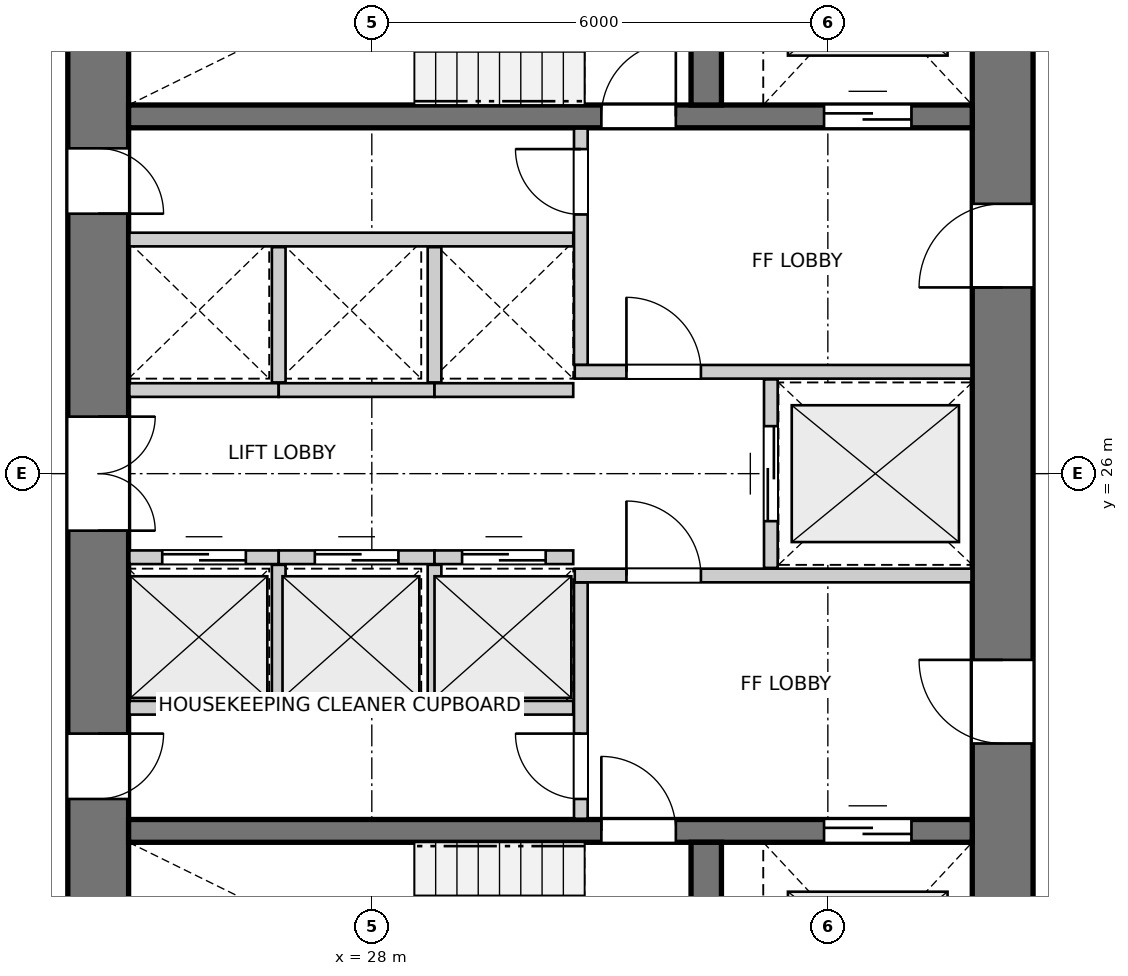
"""IFC4 building model, lengths in metres.
Left out: names, types, materials, properties, quantities, classifications, styles, units other than length and angle.
Written with IfcOpenShell. Run it as: python <this file> out.ifc"""

import sys

from ifc_helpers import new_model, si_unit, direction, frame, frame_2d, origin, place, context, subcontext, project, spatial, rectangle, extrude, source, transform, mapped, element, fill, save


model = new_model("IFC4")
c1 = context("Model", 3, precision=1e-05, world=origin(), true_north=direction((0.0, 1.0)))
c2 = subcontext(c1, "Body", "Model", "MODEL_VIEW")
j1 = project(units=[si_unit("LENGTHUNIT", "METRE"), si_unit("PLANEANGLEUNIT", "RADIAN")], contexts=[c1])
p1 = place(None, origin())
s1 = spatial("IfcSite", under=j1, at=p1, CompositionType="ELEMENT")
p2 = place(p1, origin())
s2 = spatial("IfcBuilding", under=s1, at=p2, CompositionType="ELEMENT")
p3 = place(p2, frame((0.0, 0.0, 11.0)))
s3 = spatial("IfcBuildingStorey", under=s2, at=p3, CompositionType="ELEMENT", Elevation=11.0)
p4 = place(p3, frame((24.4, 33.8, 0.0), z_axis=(0.0, 0.0, 1.0), x_axis=(0.0, -1.0, 0.0)))
e1 = element("IfcWall", 1, at=p4, inside=s3, PredefinedType="SHEAR", context=c2, shape_type="SweptSolid", body=[
    extrude(rectangle(XDim=15.6, YDim=0.8, at=frame_2d((7.8, 0.0))), origin(), (0.0, 0.0, 1.0), 2.94),
])
p5 = place(p4, frame((7.05, 0.0, 0.0)))
e2 = element("IfcOpeningElement", 2, at=p5, cuts=e1, PredefinedType="OPENING", context=c2, shape_type="SweptSolid", body=[
    extrude(rectangle(XDim=1.5, YDim=2.15, at=frame_2d((0.75, 1.075))), frame((0.0, 0.41, 0.0), z_axis=(0.0, -1.0, 0.0), x_axis=(1.0, 0.0, 0.0)), (0.0, 0.0, 1.0), 0.82),
])
p6 = place(p4, frame((3.52, 0.0, 0.0)))
e3 = element("IfcOpeningElement", 3, at=p6, cuts=e1, PredefinedType="OPENING", context=c2, shape_type="SweptSolid", body=[
    extrude(rectangle(XDim=0.86, YDim=2.05, at=frame_2d((0.43, 1.025))), frame((0.0, 0.41, 0.0), z_axis=(0.0, -1.0, 0.0), x_axis=(1.0, 0.0, 0.0)), (0.0, 0.0, 1.0), 0.82),
])
p7 = place(p4, frame((11.22, 0.0, 0.0)))
e4 = element("IfcOpeningElement", 4, at=p7, cuts=e1, PredefinedType="OPENING", context=c2, shape_type="SweptSolid", body=[
    extrude(rectangle(XDim=0.86, YDim=2.05, at=frame_2d((0.43, 1.025))), frame((0.0, 0.41, 0.0), z_axis=(0.0, -1.0, 0.0), x_axis=(1.0, 0.0, 0.0)), (0.0, 0.0, 1.0), 0.82),
])
p8 = place(p3, frame((36.3, 18.2, 0.0), z_axis=(0.0, 0.0, 1.0), x_axis=(0.0, 1.0, 0.0)))
e5 = element("IfcWall", 5, at=p8, inside=s3, PredefinedType="SHEAR", context=c2, shape_type="SweptSolid", body=[
    extrude(rectangle(XDim=15.6, YDim=0.8, at=frame_2d((7.8, 0.0))), origin(), (0.0, 0.0, 1.0), 2.94),
])
p9 = place(p8, frame((4.25, 0.0, 0.0)))
e6 = element("IfcOpeningElement", 6, at=p9, cuts=e5, PredefinedType="OPENING", context=c2, shape_type="SweptSolid", body=[
    extrude(rectangle(XDim=1.1, YDim=2.15, at=frame_2d((0.55, 1.075))), frame((0.0, 0.41, 0.0), z_axis=(0.0, -1.0, 0.0), x_axis=(1.0, 0.0, 0.0)), (0.0, 0.0, 1.0), 0.82),
])
p10 = place(p8, frame((10.25, 0.0, 0.0)))
e7 = element("IfcOpeningElement", 7, at=p10, cuts=e5, PredefinedType="OPENING", context=c2, shape_type="SweptSolid", body=[
    extrude(rectangle(XDim=1.1, YDim=2.15, at=frame_2d((0.55, 1.075))), frame((0.0, 0.41, 0.0), z_axis=(0.0, -1.0, 0.0), x_axis=(1.0, 0.0, 0.0)), (0.0, 0.0, 1.0), 0.82),
])
p11 = place(p3, frame((24.8, 21.3, 0.0), z_axis=(0.0, 0.0, 1.0), x_axis=(1.0, 0.0, 0.0)))
e8 = element("IfcWall", 8, at=p11, inside=s3, PredefinedType="SHEAR", context=c2, shape_type="SweptSolid", body=[
    extrude(rectangle(XDim=11.1, YDim=0.3, at=frame_2d((5.55, 0.0))), origin(), (0.0, 0.0, 1.0), 2.94),
])
p12 = place(p11, frame((6.22, 0.0, 0.0)))
e9 = element("IfcOpeningElement", 9, at=p12, cuts=e8, PredefinedType="OPENING", context=c2, shape_type="SweptSolid", body=[
    extrude(rectangle(XDim=0.98, YDim=2.15, at=frame_2d((0.49, 1.075))), frame((0.0, 0.16, 0.0), z_axis=(0.0, -1.0, 0.0), x_axis=(1.0, 0.0, 0.0)), (0.0, 0.0, 1.0), 0.32),
])
p13 = place(p11, frame((9.15, 0.0, 0.0)))
e10 = element("IfcOpeningElement", 10, at=p13, cuts=e8, PredefinedType="OPENING", context=c2, shape_type="SweptSolid", body=[
    extrude(rectangle(XDim=1.15, YDim=2.15, at=frame_2d((0.575, 1.075))), frame((0.0, 0.16, 0.0), z_axis=(0.0, -1.0, 0.0), x_axis=(1.0, 0.0, 0.0)), (0.0, 0.0, 1.0), 0.32),
])
p14 = place(p3, frame((32.4, 18.2, 0.0), z_axis=(0.0, 0.0, 1.0), x_axis=(0.0, 1.0, 0.0)))
e11 = element("IfcWall", 11, at=p14, inside=s3, PredefinedType="SHEAR", context=c2, shape_type="SweptSolid", body=[
    extrude(rectangle(XDim=2.95, YDim=0.4, at=frame_2d((1.475, 0.0))), origin(), (0.0, 0.0, 1.0), 2.94),
])
p15 = place(p3, frame((24.8, 30.7, 0.0), z_axis=(0.0, 0.0, 1.0), x_axis=(1.0, 0.0, 0.0)))
e12 = element("IfcWall", 12, at=p15, inside=s3, PredefinedType="SHEAR", context=c2, shape_type="SweptSolid", body=[
    extrude(rectangle(XDim=11.1, YDim=0.3, at=frame_2d((5.55, 0.0))), origin(), (0.0, 0.0, 1.0), 2.94),
])
p16 = place(p15, frame((6.22, 0.0, 0.0)))
e13 = element("IfcOpeningElement", 13, at=p16, cuts=e12, PredefinedType="OPENING", context=c2, shape_type="SweptSolid", body=[
    extrude(rectangle(XDim=0.98, YDim=2.15, at=frame_2d((0.49, 1.075))), frame((0.0, 0.16, 0.0), z_axis=(0.0, -1.0, 0.0), x_axis=(1.0, 0.0, 0.0)), (0.0, 0.0, 1.0), 0.32),
])
p17 = place(p15, frame((9.15, 0.0, 0.0)))
e14 = element("IfcOpeningElement", 14, at=p17, cuts=e12, PredefinedType="OPENING", context=c2, shape_type="SweptSolid", body=[
    extrude(rectangle(XDim=1.15, YDim=2.15, at=frame_2d((0.575, 1.075))), frame((0.0, 0.16, 0.0), z_axis=(0.0, -1.0, 0.0), x_axis=(1.0, 0.0, 0.0)), (0.0, 0.0, 1.0), 0.32),
])
p18 = place(p3, frame((32.4, 30.85, 0.0), z_axis=(0.0, 0.0, 1.0), x_axis=(0.0, 1.0, 0.0)))
e15 = element("IfcWall", 15, at=p18, inside=s3, PredefinedType="SHEAR", context=c2, shape_type="SweptSolid", body=[
    extrude(rectangle(XDim=2.95, YDim=0.4, at=frame_2d((1.475, 0.0))), origin(), (0.0, 0.0, 1.0), 2.94),
])
p19 = place(p3, frame((30.75, 21.46, 0.0), z_axis=(0.0, 0.0, 1.0), x_axis=(0.0, 1.0, 0.0)))
e16 = element("IfcWall", 16, at=p19, inside=s3, PredefinedType="PARTITIONING", context=c2, shape_type="SweptSolid", body=[
    extrude(rectangle(XDim=3.11, YDim=0.18, at=frame_2d((1.555, 0.0))), origin(), (0.0, 0.0, 1.0), 2.94),
])
p20 = place(p19, frame((0.26, 0.0, 0.0)))
e17 = element("IfcOpeningElement", 17, at=p20, cuts=e16, PredefinedType="OPENING", context=c2, shape_type="SweptSolid", body=[
    extrude(rectangle(XDim=0.86, YDim=2.05, at=frame_2d((0.43, 1.025))), frame((0.0, 0.1, 0.0), z_axis=(0.0, -1.0, 0.0), x_axis=(1.0, 0.0, 0.0)), (0.0, 0.0, 1.0), 0.2),
])
p21 = place(p3, frame((30.67, 24.66, 0.0), z_axis=(0.0, 0.0, 1.0), x_axis=(1.0, 0.0, 0.0)))
e18 = element("IfcWall", 18, at=p21, inside=s3, PredefinedType="PARTITIONING", context=c2, shape_type="SweptSolid", body=[
    extrude(rectangle(XDim=5.22, YDim=0.18, at=frame_2d((2.61, 0.0))), origin(), (0.0, 0.0, 1.0), 2.94),
])
p22 = place(p21, frame((0.68, 0.0, 0.0)))
e19 = element("IfcOpeningElement", 19, at=p22, cuts=e18, PredefinedType="OPENING", context=c2, shape_type="SweptSolid", body=[
    extrude(rectangle(XDim=0.98, YDim=2.15, at=frame_2d((0.49, 1.075))), frame((0.0, 0.1, 0.0), z_axis=(0.0, -1.0, 0.0), x_axis=(1.0, 0.0, 0.0)), (0.0, 0.0, 1.0), 0.2),
])
p23 = place(p3, frame((30.75, 27.43, 0.0), z_axis=(0.0, 0.0, 1.0), x_axis=(0.0, 1.0, 0.0)))
e20 = element("IfcWall", 20, at=p23, inside=s3, PredefinedType="PARTITIONING", context=c2, shape_type="SweptSolid", body=[
    extrude(rectangle(XDim=3.11, YDim=0.18, at=frame_2d((1.555, 0.0))), origin(), (0.0, 0.0, 1.0), 2.94),
])
p24 = place(p23, frame((1.98, 0.0, 0.0)))
e21 = element("IfcOpeningElement", 21, at=p24, cuts=e20, PredefinedType="OPENING", context=c2, shape_type="SweptSolid", body=[
    extrude(rectangle(XDim=0.86, YDim=2.05, at=frame_2d((0.43, 1.025))), frame((0.0, 0.1, 0.0), z_axis=(0.0, -1.0, 0.0), x_axis=(1.0, 0.0, 0.0)), (0.0, 0.0, 1.0), 0.2),
])
p25 = place(p3, frame((30.67, 27.34, 0.0), z_axis=(0.0, 0.0, 1.0), x_axis=(1.0, 0.0, 0.0)))
e22 = element("IfcWall", 22, at=p25, inside=s3, PredefinedType="PARTITIONING", context=c2, shape_type="SweptSolid", body=[
    extrude(rectangle(XDim=5.22, YDim=0.18, at=frame_2d((2.61, 0.0))), origin(), (0.0, 0.0, 1.0), 2.94),
])
p26 = place(p25, frame((0.68, 0.0, 0.0)))
e23 = element("IfcOpeningElement", 23, at=p26, cuts=e22, PredefinedType="OPENING", context=c2, shape_type="SweptSolid", body=[
    extrude(rectangle(XDim=0.98, YDim=2.15, at=frame_2d((0.49, 1.075))), frame((0.0, 0.1, 0.0), z_axis=(0.0, -1.0, 0.0), x_axis=(1.0, 0.0, 0.0)), (0.0, 0.0, 1.0), 0.2),
])
p27 = place(p3, frame((33.25, 24.76, 0.0), z_axis=(0.0, 0.0, 1.0), x_axis=(0.0, 1.0, 0.0)))
e24 = element("IfcWall", 24, at=p27, inside=s3, PredefinedType="PARTITIONING", context=c2, shape_type="SweptSolid", body=[
    extrude(rectangle(XDim=2.48, YDim=0.18, at=frame_2d((1.24, 0.0))), origin(), (0.0, 0.0, 1.0), 2.94),
])
p28 = place(p27, frame((0.615, 0.0, 0.0)))
e25 = element("IfcOpeningElement", 25, at=p28, cuts=e24, PredefinedType="OPENING", context=c2, shape_type="SweptSolid", body=[
    extrude(rectangle(XDim=1.25, YDim=2.15, at=frame_2d((0.625, 1.075))), frame((0.0, 0.1, 0.0), z_axis=(0.0, -1.0, 0.0), x_axis=(1.0, 0.0, 0.0)), (0.0, 0.0, 1.0), 0.2),
])
p29 = place(p3, frame((24.81, 22.92, 0.0), z_axis=(0.0, 0.0, 1.0), x_axis=(1.0, 0.0, 0.0)))
e26 = element("IfcWall", 26, at=p29, inside=s3, PredefinedType="PARTITIONING", context=c2, shape_type="SweptSolid", body=[
    extrude(rectangle(XDim=5.84, YDim=0.18, at=frame_2d((2.92, 0.0))), origin(), (0.0, 0.0, 1.0), 2.94),
])
p30 = place(p3, frame((24.81, 24.9, 0.0), z_axis=(0.0, 0.0, 1.0), x_axis=(1.0, 0.0, 0.0)))
e27 = element("IfcWall", 27, at=p30, inside=s3, PredefinedType="PARTITIONING", context=c2, shape_type="SweptSolid", body=[
    extrude(rectangle(XDim=1.965, YDim=0.18, at=frame_2d((0.982, 0.0))), origin(), (0.0, 0.0, 1.0), 2.94),
])
p31 = place(p30, frame((0.433, 0.0, 0.0)))
e28 = element("IfcOpeningElement", 28, at=p31, cuts=e27, PredefinedType="OPENING", context=c2, shape_type="SweptSolid", body=[
    extrude(rectangle(XDim=1.1, YDim=2.15, at=frame_2d((0.55, 1.075))), frame((0.0, 0.1, 0.0), z_axis=(0.0, -1.0, 0.0), x_axis=(1.0, 0.0, 0.0)), (0.0, 0.0, 1.0), 0.2),
])
p32 = place(p3, frame((26.775, 24.9, 0.0), z_axis=(0.0, 0.0, 1.0), x_axis=(1.0, 0.0, 0.0)))
e29 = element("IfcWall", 29, at=p32, inside=s3, PredefinedType="PARTITIONING", context=c2, shape_type="SweptSolid", body=[
    extrude(rectangle(XDim=2.05, YDim=0.18, at=frame_2d((1.025, 0.0))), origin(), (0.0, 0.0, 1.0), 2.94),
])
p33 = place(p32, frame((0.475, 0.0, 0.0)))
e30 = element("IfcOpeningElement", 30, at=p33, cuts=e29, PredefinedType="OPENING", context=c2, shape_type="SweptSolid", body=[
    extrude(rectangle(XDim=1.1, YDim=2.15, at=frame_2d((0.55, 1.075))), frame((0.0, 0.1, 0.0), z_axis=(0.0, -1.0, 0.0), x_axis=(1.0, 0.0, 0.0)), (0.0, 0.0, 1.0), 0.2),
])
p34 = place(p3, frame((26.775, 23.02, 0.0), z_axis=(0.0, 0.0, 1.0), x_axis=(0.0, 1.0, 0.0)))
e31 = element("IfcWall", 31, at=p34, inside=s3, PredefinedType="PARTITIONING", context=c2, shape_type="SweptSolid", body=[
    extrude(rectangle(XDim=1.78, YDim=0.18, at=frame_2d((0.89, 0.0))), origin(), (0.0, 0.0, 1.0), 2.94),
])
p35 = place(p3, frame((28.825, 24.9, 0.0), z_axis=(0.0, 0.0, 1.0), x_axis=(1.0, 0.0, 0.0)))
e32 = element("IfcWall", 32, at=p35, inside=s3, PredefinedType="PARTITIONING", context=c2, shape_type="SweptSolid", body=[
    extrude(rectangle(XDim=1.825, YDim=0.18, at=frame_2d((0.913, 0.0))), origin(), (0.0, 0.0, 1.0), 2.94),
])
p36 = place(p35, frame((0.363, 0.0, 0.0)))
e33 = element("IfcOpeningElement", 33, at=p36, cuts=e32, PredefinedType="OPENING", context=c2, shape_type="SweptSolid", body=[
    extrude(rectangle(XDim=1.1, YDim=2.15, at=frame_2d((0.55, 1.075))), frame((0.0, 0.1, 0.0), z_axis=(0.0, -1.0, 0.0), x_axis=(1.0, 0.0, 0.0)), (0.0, 0.0, 1.0), 0.2),
])
p37 = place(p3, frame((28.825, 23.02, 0.0), z_axis=(0.0, 0.0, 1.0), x_axis=(0.0, 1.0, 0.0)))
e34 = element("IfcWall", 34, at=p37, inside=s3, PredefinedType="PARTITIONING", context=c2, shape_type="SweptSolid", body=[
    extrude(rectangle(XDim=1.78, YDim=0.18, at=frame_2d((0.89, 0.0))), origin(), (0.0, 0.0, 1.0), 2.94),
])
p38 = place(p3, frame((24.81, 29.08, 0.0), z_axis=(0.0, 0.0, 1.0), x_axis=(1.0, 0.0, 0.0)))
e35 = element("IfcWall", 35, at=p38, inside=s3, PredefinedType="PARTITIONING", context=c2, shape_type="SweptSolid", body=[
    extrude(rectangle(XDim=5.84, YDim=0.18, at=frame_2d((2.92, 0.0))), origin(), (0.0, 0.0, 1.0), 2.94),
])
p39 = place(p3, frame((24.81, 27.1, 0.0), z_axis=(0.0, 0.0, 1.0), x_axis=(1.0, 0.0, 0.0)))
e36 = element("IfcWall", 36, at=p39, inside=s3, PredefinedType="PARTITIONING", context=c2, shape_type="SweptSolid", body=[
    extrude(rectangle(XDim=1.965, YDim=0.18, at=frame_2d((0.982, 0.0))), origin(), (0.0, 0.0, 1.0), 2.94),
])
p40 = place(p3, frame((26.775, 27.1, 0.0), z_axis=(0.0, 0.0, 1.0), x_axis=(1.0, 0.0, 0.0)))
e37 = element("IfcWall", 37, at=p40, inside=s3, PredefinedType="PARTITIONING", context=c2, shape_type="SweptSolid", body=[
    extrude(rectangle(XDim=2.05, YDim=0.18, at=frame_2d((1.025, 0.0))), origin(), (0.0, 0.0, 1.0), 2.94),
])
p41 = place(p3, frame((26.775, 27.2, 0.0), z_axis=(0.0, 0.0, 1.0), x_axis=(0.0, 1.0, 0.0)))
e38 = element("IfcWall", 38, at=p41, inside=s3, PredefinedType="PARTITIONING", context=c2, shape_type="SweptSolid", body=[
    extrude(rectangle(XDim=1.78, YDim=0.18, at=frame_2d((0.89, 0.0))), origin(), (0.0, 0.0, 1.0), 2.94),
])
p42 = place(p3, frame((28.825, 27.1, 0.0), z_axis=(0.0, 0.0, 1.0), x_axis=(1.0, 0.0, 0.0)))
e39 = element("IfcWall", 39, at=p42, inside=s3, PredefinedType="PARTITIONING", context=c2, shape_type="SweptSolid", body=[
    extrude(rectangle(XDim=1.825, YDim=0.18, at=frame_2d((0.913, 0.0))), origin(), (0.0, 0.0, 1.0), 2.94),
])
p43 = place(p3, frame((28.825, 27.2, 0.0), z_axis=(0.0, 0.0, 1.0), x_axis=(0.0, 1.0, 0.0)))
e40 = element("IfcWall", 40, at=p43, inside=s3, PredefinedType="PARTITIONING", context=c2, shape_type="SweptSolid", body=[
    extrude(rectangle(XDim=1.78, YDim=0.18, at=frame_2d((0.89, 0.0))), origin(), (0.0, 0.0, 1.0), 2.94),
])
m1 = source(origin(), c2, "Body", "SweptSolid", [
    extrude(rectangle(XDim=0.98, YDim=2.15, at=frame_2d((0.49, 1.075))), frame((0.0, 0.025, 0.0), z_axis=(0.0, -1.0, 0.0), x_axis=(1.0, 0.0, 0.0)), (0.0, 0.0, 1.0), 0.05),
])
p44 = place(p12, origin())
e41 = element("IfcDoor", 41, at=p44, inside=s3, OperationType="SINGLE_SWING_LEFT", PredefinedType="DOOR", context=c2, shape_type="MappedRepresentation", body=[
    mapped(m1, transform((0.0, 0.0, 0.0), x_axis=(1.0, 0.0, 0.0), y_axis=(0.0, 1.0, 0.0), z_axis=(0.0, 0.0, 1.0), scale=1.0)),
])
fill(e9, e41)
m2 = source(origin(), c2, "Body", "SweptSolid", [
    extrude(rectangle(XDim=1.15, YDim=2.15, at=frame_2d((0.575, 1.075))), frame((0.0, 0.025, 0.0), z_axis=(0.0, -1.0, 0.0), x_axis=(1.0, 0.0, 0.0)), (0.0, 0.0, 1.0), 0.05),
])
p45 = place(p13, origin())
e42 = element("IfcDoor", 42, at=p45, inside=s3, OperationType="DOUBLE_DOOR_SLIDING", PredefinedType="DOOR", context=c2, shape_type="MappedRepresentation", body=[
    mapped(m2, transform((0.0, 0.0, 0.0), x_axis=(1.0, 0.0, 0.0), y_axis=(0.0, 1.0, 0.0), z_axis=(0.0, 0.0, 1.0), scale=1.0)),
])
fill(e10, e42)
p46 = place(p16, origin())
e43 = element("IfcDoor", 43, at=p46, inside=s3, OperationType="SINGLE_SWING_RIGHT", PredefinedType="DOOR", context=c2, shape_type="MappedRepresentation", body=[
    mapped(m1, transform((0.0, 0.0, 0.0), x_axis=(1.0, 0.0, 0.0), y_axis=(0.0, 1.0, 0.0), z_axis=(0.0, 0.0, 1.0), scale=1.0)),
])
fill(e13, e43)
p47 = place(p17, origin())
e44 = element("IfcDoor", 44, at=p47, inside=s3, OperationType="DOUBLE_DOOR_SLIDING", PredefinedType="DOOR", context=c2, shape_type="MappedRepresentation", body=[
    mapped(m2, transform((0.0, 0.0, 0.0), x_axis=(1.0, 0.0, 0.0), y_axis=(0.0, 1.0, 0.0), z_axis=(0.0, 0.0, 1.0), scale=1.0)),
])
fill(e14, e44)
m3 = source(origin(), c2, "Body", "SweptSolid", [
    extrude(rectangle(XDim=1.1, YDim=2.15, at=frame_2d((0.55, 1.075))), frame((0.0, 0.025, 0.0), z_axis=(0.0, -1.0, 0.0), x_axis=(1.0, 0.0, 0.0)), (0.0, 0.0, 1.0), 0.05),
])
p48 = place(p9, origin())
e45 = element("IfcDoor", 45, at=p48, inside=s3, OperationType="SINGLE_SWING_RIGHT", PredefinedType="DOOR", context=c2, shape_type="MappedRepresentation", body=[
    mapped(m3, transform((0.0, 0.0, 0.0), x_axis=(1.0, 0.0, 0.0), y_axis=(0.0, 1.0, 0.0), z_axis=(0.0, 0.0, 1.0), scale=1.0)),
])
fill(e6, e45)
p49 = place(p10, origin())
e46 = element("IfcDoor", 46, at=p49, inside=s3, OperationType="SINGLE_SWING_LEFT", PredefinedType="DOOR", context=c2, shape_type="MappedRepresentation", body=[
    mapped(m3, transform((0.0, 0.0, 0.0), x_axis=(1.0, 0.0, 0.0), y_axis=(0.0, 1.0, 0.0), z_axis=(0.0, 0.0, 1.0), scale=1.0)),
])
fill(e7, e46)
m4 = source(origin(), c2, "Body", "SweptSolid", [
    extrude(rectangle(XDim=1.5, YDim=2.15, at=frame_2d((0.75, 1.075))), frame((0.0, 0.025, 0.0), z_axis=(0.0, -1.0, 0.0), x_axis=(1.0, 0.0, 0.0)), (0.0, 0.0, 1.0), 0.05),
])
p50 = place(p5, origin())
e47 = element("IfcDoor", 47, at=p50, inside=s3, OperationType="DOUBLE_DOOR_SINGLE_SWING", PredefinedType="DOOR", context=c2, shape_type="MappedRepresentation", body=[
    mapped(m4, transform((0.0, 0.0, 0.0), x_axis=(1.0, 0.0, 0.0), y_axis=(0.0, 1.0, 0.0), z_axis=(0.0, 0.0, 1.0), scale=1.0)),
])
fill(e2, e47)
m5 = source(origin(), c2, "Body", "SweptSolid", [
    extrude(rectangle(XDim=0.86, YDim=2.05, at=frame_2d((0.43, 1.025))), frame((0.0, 0.025, 0.0), z_axis=(0.0, -1.0, 0.0), x_axis=(1.0, 0.0, 0.0)), (0.0, 0.0, 1.0), 0.05),
])
p51 = place(p6, origin())
e48 = element("IfcDoor", 48, at=p51, inside=s3, OperationType="SINGLE_SWING_RIGHT", PredefinedType="DOOR", context=c2, shape_type="MappedRepresentation", body=[
    mapped(m5, transform((0.0, 0.0, 0.0), x_axis=(1.0, 0.0, 0.0), y_axis=(0.0, 1.0, 0.0), z_axis=(0.0, 0.0, 1.0), scale=1.0)),
])
fill(e3, e48)
p52 = place(p7, origin())
e49 = element("IfcDoor", 49, at=p52, inside=s3, OperationType="SINGLE_SWING_LEFT", PredefinedType="DOOR", context=c2, shape_type="MappedRepresentation", body=[
    mapped(m5, transform((0.0, 0.0, 0.0), x_axis=(1.0, 0.0, 0.0), y_axis=(0.0, 1.0, 0.0), z_axis=(0.0, 0.0, 1.0), scale=1.0)),
])
fill(e4, e49)
p53 = place(p20, origin())
e50 = element("IfcDoor", 50, at=p53, inside=s3, OperationType="SINGLE_SWING_RIGHT", PredefinedType="DOOR", context=c2, shape_type="MappedRepresentation", body=[
    mapped(m5, transform((0.0, 0.0, 0.0), x_axis=(1.0, 0.0, 0.0), y_axis=(0.0, 1.0, 0.0), z_axis=(0.0, 0.0, 1.0), scale=1.0)),
])
fill(e17, e50)
p54 = place(p22, origin())
e51 = element("IfcDoor", 51, at=p54, inside=s3, OperationType="SINGLE_SWING_LEFT", PredefinedType="DOOR", context=c2, shape_type="MappedRepresentation", body=[
    mapped(m1, transform((0.0, 0.0, 0.0), x_axis=(1.0, 0.0, 0.0), y_axis=(0.0, 1.0, 0.0), z_axis=(0.0, 0.0, 1.0), scale=1.0)),
])
fill(e19, e51)
p55 = place(p24, origin())
e52 = element("IfcDoor", 52, at=p55, inside=s3, OperationType="SINGLE_SWING_RIGHT", PredefinedType="DOOR", context=c2, shape_type="MappedRepresentation", body=[
    mapped(m5, transform((0.0, 0.0, 0.0), x_axis=(1.0, 0.0, 0.0), y_axis=(0.0, 1.0, 0.0), z_axis=(0.0, 0.0, 1.0), scale=1.0)),
])
fill(e21, e52)
p56 = place(p26, origin())
e53 = element("IfcDoor", 53, at=p56, inside=s3, OperationType="SINGLE_SWING_LEFT", PredefinedType="DOOR", context=c2, shape_type="MappedRepresentation", body=[
    mapped(m1, transform((0.0, 0.0, 0.0), x_axis=(1.0, 0.0, 0.0), y_axis=(0.0, 1.0, 0.0), z_axis=(0.0, 0.0, 1.0), scale=1.0)),
])
fill(e23, e53)
m6 = source(origin(), c2, "Body", "SweptSolid", [
    extrude(rectangle(XDim=1.25, YDim=2.15, at=frame_2d((0.625, 1.075))), frame((0.0, 0.025, 0.0), z_axis=(0.0, -1.0, 0.0), x_axis=(1.0, 0.0, 0.0)), (0.0, 0.0, 1.0), 0.05),
])
p57 = place(p28, origin())
e54 = element("IfcDoor", 54, at=p57, inside=s3, OperationType="DOUBLE_DOOR_SLIDING", PredefinedType="DOOR", context=c2, shape_type="MappedRepresentation", body=[
    mapped(m6, transform((0.0, 0.0, 0.0), x_axis=(1.0, 0.0, 0.0), y_axis=(0.0, 1.0, 0.0), z_axis=(0.0, 0.0, 1.0), scale=1.0)),
])
fill(e25, e54)
p58 = place(p31, origin())
e55 = element("IfcDoor", 55, at=p58, inside=s3, OperationType="DOUBLE_DOOR_SLIDING", PredefinedType="DOOR", context=c2, shape_type="MappedRepresentation", body=[
    mapped(m3, transform((0.0, 0.0, 0.0), x_axis=(1.0, 0.0, 0.0), y_axis=(0.0, 1.0, 0.0), z_axis=(0.0, 0.0, 1.0), scale=1.0)),
])
fill(e28, e55)
p59 = place(p33, origin())
e56 = element("IfcDoor", 56, at=p59, inside=s3, OperationType="DOUBLE_DOOR_SLIDING", PredefinedType="DOOR", context=c2, shape_type="MappedRepresentation", body=[
    mapped(m3, transform((0.0, 0.0, 0.0), x_axis=(1.0, 0.0, 0.0), y_axis=(0.0, 1.0, 0.0), z_axis=(0.0, 0.0, 1.0), scale=1.0)),
])
fill(e30, e56)
p60 = place(p36, origin())
e57 = element("IfcDoor", 57, at=p60, inside=s3, OperationType="DOUBLE_DOOR_SLIDING", PredefinedType="DOOR", context=c2, shape_type="MappedRepresentation", body=[
    mapped(m3, transform((0.0, 0.0, 0.0), x_axis=(1.0, 0.0, 0.0), y_axis=(0.0, 1.0, 0.0), z_axis=(0.0, 0.0, 1.0), scale=1.0)),
])
fill(e33, e57)
save(model, sys.argv[1])
